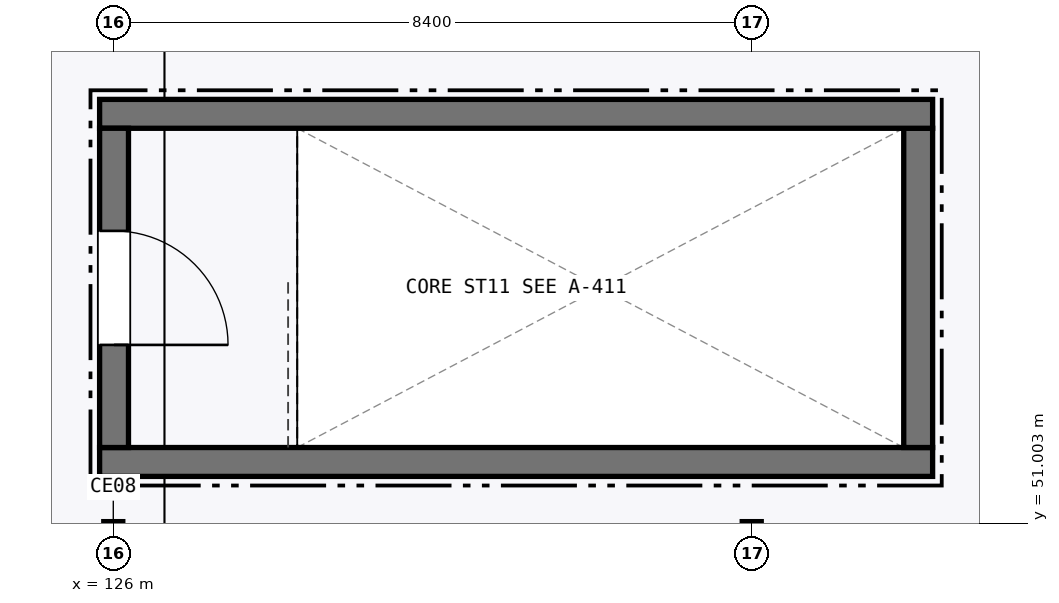
"""IFC4 building model, lengths in metres.
Left out: names, types, materials, properties, quantities, classifications, styles, units other than length and angle.
Written with IfcOpenShell. Run it as: python <this file> out.ifc"""

import sys

from ifc_helpers import new_model, si_unit, direction, frame, frame_2d, origin, origin_2d, place, context, subcontext, project, spatial, rectangle, i_section, extrude, element, fill, save


model = new_model("IFC4")
c1 = context("Model", 3, precision=1e-05, world=origin(), true_north=direction((0.0, 1.0)))
c2 = subcontext(c1, "Body", "Model", "MODEL_VIEW")
j1 = project(units=[si_unit("LENGTHUNIT", "METRE"), si_unit("PLANEANGLEUNIT", "RADIAN")], contexts=[c1])
p1 = place(None, origin())
s1 = spatial("IfcSite", under=j1, at=p1, CompositionType="ELEMENT")
p2 = place(p1, origin())
s2 = spatial("IfcBuilding", under=s1, at=p2, CompositionType="ELEMENT")
p3 = place(p2, frame((0.0, 0.0, 36.3)))
s3 = spatial("IfcBuildingStorey", under=s2, at=p3, CompositionType="ELEMENT", Elevation=36.3)
for number, where, z_axis, x_axis in (
    (1, (126.0, 50.9, 0.0), (0.0, 0.0, 1.0), (1.0, 0.0, 0.0)),
    (2, (134.4, 50.9, 0.0), (0.0, 0.0, 1.0), (1.0, 0.0, 0.0)),
):
    element("IfcColumn", number, at=place(p3, frame(where, z_axis=z_axis, x_axis=x_axis)), inside=s3, PredefinedType="COLUMN", context=c2, shape_type="SweptSolid", body=[
        extrude(i_section(OverallWidth=0.25, OverallDepth=0.25, WebThickness=0.009, FlangeThickness=0.014, FilletRadius=0.016, at=origin_2d()), origin(), (0.0, 0.0, 1.0), 4.5),
    ])
p4 = place(p3, frame((125.82, 51.81, 0.0), z_axis=(0.0, 0.0, 1.0), x_axis=(1.0, 0.0, 0.0)))
e3 = element("IfcWall", 3, at=p4, inside=s3, PredefinedType="SHEAR", context=c2, shape_type="SweptSolid", body=[
    extrude(rectangle(XDim=10.96, YDim=0.38, at=frame_2d((5.48, 0.0))), origin(), (0.0, 0.0, 1.0), 4.245),
])
p5 = place(p3, frame((136.59, 52.0, 0.0), z_axis=(0.0, 0.0, 1.0), x_axis=(0.0, 1.0, 0.0)))
e4 = element("IfcWall", 4, at=p5, inside=s3, PredefinedType="SHEAR", context=c2, shape_type="SweptSolid", body=[
    extrude(rectangle(XDim=4.2, YDim=0.38, at=frame_2d((2.1, 0.0))), origin(), (0.0, 0.0, 1.0), 4.245),
])
p6 = place(p3, frame((136.78, 56.39, 0.0), z_axis=(0.0, 0.0, 1.0), x_axis=(-1.0, 0.0, 0.0)))
e5 = element("IfcWall", 5, at=p6, inside=s3, PredefinedType="SHEAR", context=c2, shape_type="SweptSolid", body=[
    extrude(rectangle(XDim=10.96, YDim=0.38, at=frame_2d((5.48, 0.0))), origin(), (0.0, 0.0, 1.0), 4.245),
])
p7 = place(p3, frame((126.01, 56.2, 0.0), z_axis=(0.0, 0.0, 1.0), x_axis=(0.0, -1.0, 0.0)))
e6 = element("IfcWall", 6, at=p7, inside=s3, PredefinedType="SHEAR", context=c2, shape_type="SweptSolid", body=[
    extrude(rectangle(XDim=4.2, YDim=0.38, at=frame_2d((2.1, 0.0))), origin(), (0.0, 0.0, 1.0), 4.245),
])
p8 = place(p7, frame((1.35, 0.0, 0.0)))
e7 = element("IfcOpeningElement", 7, at=p8, cuts=e6, PredefinedType="OPENING", context=c2, shape_type="SweptSolid", body=[
    extrude(rectangle(XDim=1.5, YDim=2.15, at=frame_2d((0.75, 1.075))), frame((0.0, 0.2, 0.0), z_axis=(0.0, -1.0, 0.0), x_axis=(1.0, 0.0, 0.0)), (0.0, 0.0, 1.0), 0.4),
])
p9 = place(p8, origin())
e8 = element("IfcDoor", 8, at=p9, inside=s3, OperationType="SINGLE_SWING_RIGHT", PredefinedType="DOOR", context=c2, shape_type="SweptSolid", body=[
    extrude(rectangle(XDim=1.5, YDim=2.15, at=frame_2d((0.75, 1.075))), frame((0.0, 0.025, 0.0), z_axis=(0.0, -1.0, 0.0), x_axis=(1.0, 0.0, 0.0)), (0.0, 0.0, 1.0), 0.05),
])
fill(e7, e8)
save(model, sys.argv[1])
